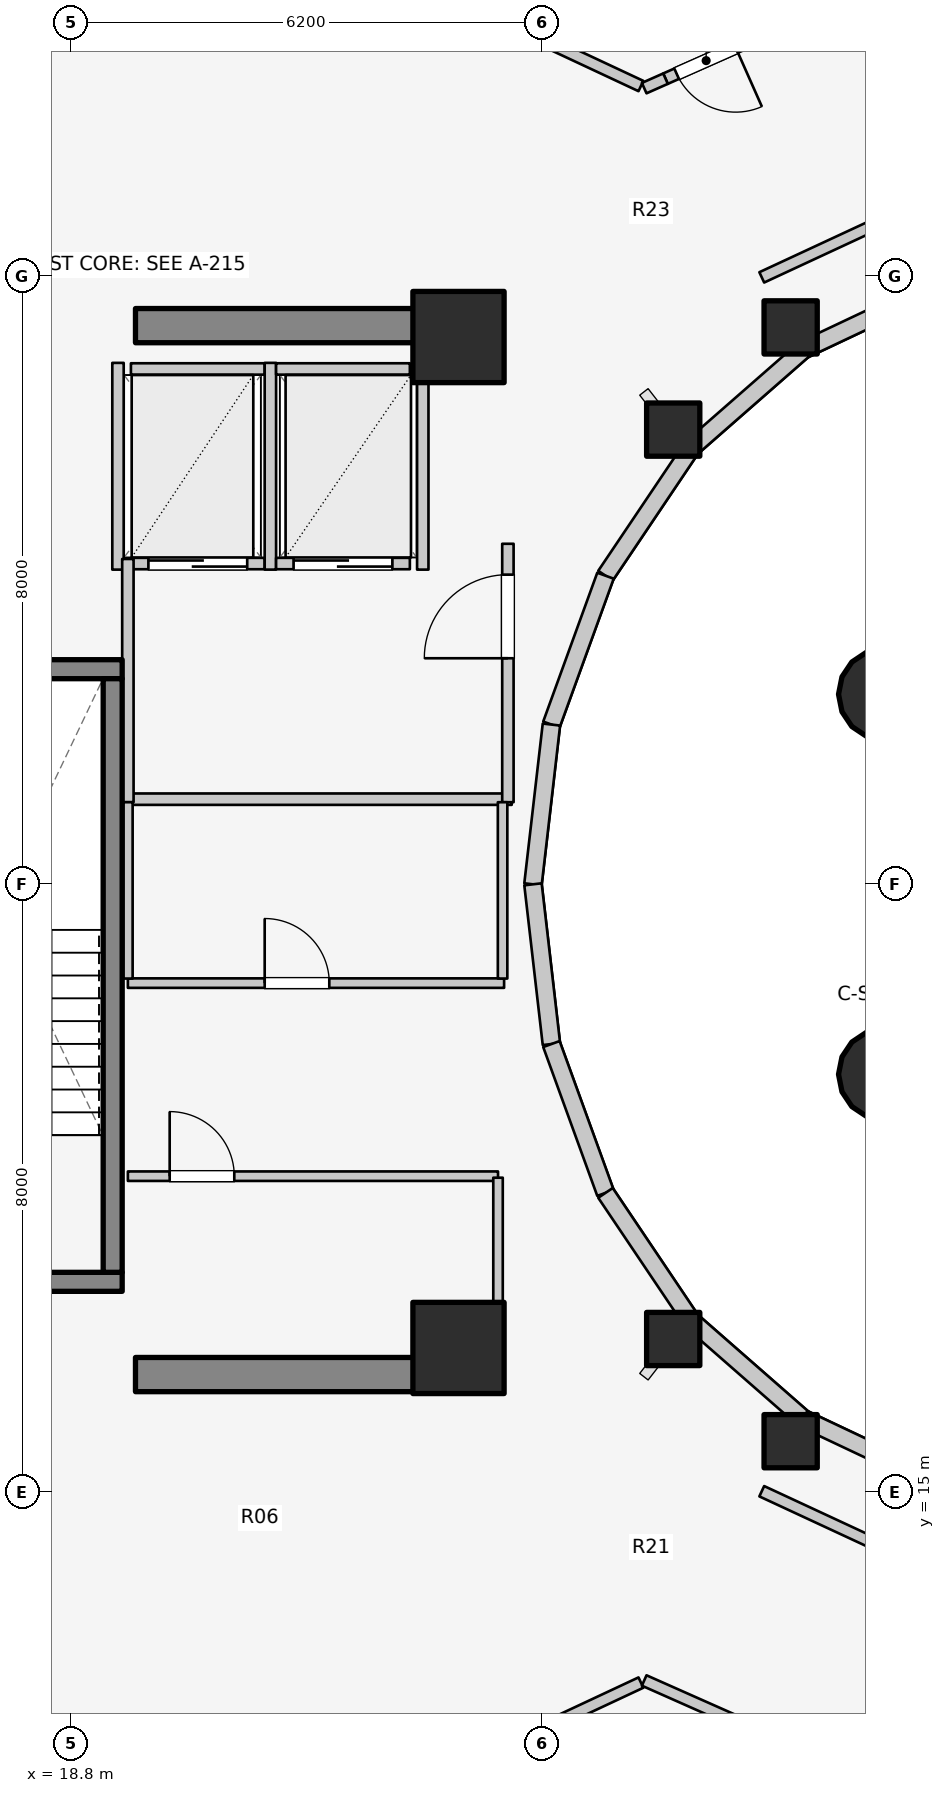
"""IFC4 building model, lengths in metres.
Left out: names, types, materials, properties, quantities, classifications, styles, units other than length and angle.
Written with IfcOpenShell. Run it as: python <this file> out.ifc"""

import sys

from ifc_helpers import new_model, si_unit, direction, frame, frame_2d, origin, origin_2d, place, context, subcontext, project, spatial, rectangle, hollow_circle, extrude, element, fill, save


model = new_model("IFC4")
c1 = context("Model", 3, precision=1e-05, world=origin(), true_north=direction((0.0, 1.0)))
c2 = subcontext(c1, "Body", "Model", "MODEL_VIEW")
j1 = project(units=[si_unit("LENGTHUNIT", "METRE"), si_unit("PLANEANGLEUNIT", "RADIAN")], contexts=[c1])
p1 = place(None, origin())
s1 = spatial("IfcSite", under=j1, at=p1, CompositionType="ELEMENT")
p2 = place(p1, origin())
s2 = spatial("IfcBuilding", under=s1, at=p2, CompositionType="ELEMENT")
p3 = place(p2, frame((0.0, 0.0, 273.2)))
s3 = spatial("IfcBuildingStorey", under=s2, at=p3, CompositionType="ELEMENT", Elevation=273.2)
for number, where, z_axis, x_axis in (
    (1, (19.65, 16.55, 0.0), (0.0, 0.0, 1.0), (1.0, 0.0, 0.0)),
    (2, (19.65, 30.35, 0.0), (0.0, 0.0, 1.0), (1.0, 0.0, 0.0)),
):
    element("IfcWall", number, at=place(p3, frame(where, z_axis=z_axis, x_axis=x_axis)), inside=s3, PredefinedType="SHEAR", context=c2, shape_type="SweptSolid", body=[
        extrude(rectangle(XDim=4.5, YDim=0.45, at=frame_2d((2.25, 0.0))), origin(), (0.0, 0.0, 1.0), 3.2),
    ])
p4 = place(p3, frame((16.105, 17.77, 0.0), z_axis=(0.0, 0.0, 1.0), x_axis=(1.0, 0.0, 0.0)))
e3 = element("IfcWall", 3, at=p4, inside=s3, PredefinedType="SOLIDWALL", context=c2, shape_type="SweptSolid", body=[
    extrude(rectangle(XDim=3.37, YDim=0.25, at=frame_2d((1.685, 0.0))), origin(), (0.0, 0.0, 1.0), 3.2),
])
p5 = place(p4, frame((1.135, 0.0, 0.0)))
e4 = element("IfcOpeningElement", 4, at=p5, cuts=e3, PredefinedType="OPENING", context=c2, shape_type="SweptSolid", body=[
    extrude(rectangle(XDim=1.1, YDim=2.1, at=frame_2d((0.55, 1.05))), frame((0.0, 0.135, 0.0), z_axis=(0.0, -1.0, 0.0), x_axis=(1.0, 0.0, 0.0)), (0.0, 0.0, 1.0), 0.27),
])
p6 = place(p3, frame((16.105, 25.83, 0.0), z_axis=(0.0, 0.0, 1.0), x_axis=(1.0, 0.0, 0.0)))
e5 = element("IfcWall", 5, at=p6, inside=s3, PredefinedType="SOLIDWALL", context=c2, shape_type="SweptSolid", body=[
    extrude(rectangle(XDim=3.37, YDim=0.25, at=frame_2d((1.685, 0.0))), origin(), (0.0, 0.0, 1.0), 3.2),
])
p7 = place(p3, frame((19.35, 17.895, 0.0), z_axis=(0.0, 0.0, 1.0), x_axis=(0.0, 1.0, 0.0)))
e6 = element("IfcWall", 6, at=p7, inside=s3, PredefinedType="SOLIDWALL", context=c2, shape_type="SweptSolid", body=[
    extrude(rectangle(XDim=7.81, YDim=0.25, at=frame_2d((3.905, 0.0))), origin(), (0.0, 0.0, 1.0), 3.2),
])
for number, where, z_axis, x_axis in (
    (7, (23.9, 16.9, 0.0), (0.0, 0.0, 1.0), (1.0, 0.0, 0.0)),
    (8, (23.9, 30.2, 0.0), (0.0, 0.0, 1.0), (1.0, 0.0, 0.0)),
):
    element("IfcColumn", number, at=place(p3, frame(where, z_axis=z_axis, x_axis=x_axis)), inside=s3, PredefinedType="COLUMN", context=c2, shape_type="SweptSolid", body=[
        extrude(rectangle(XDim=1.2, YDim=1.2, at=origin_2d()), origin(), (0.0, 0.0, 1.0), 3.2),
    ])
for number, where, z_axis, x_axis in (
    (9, (28.27, 30.327, 0.0), (0.0, 0.0, 1.0), (1.0, 0.0, 0.0)),
    (10, (26.725, 28.982, 0.0), (0.0, 0.0, 1.0), (1.0, 0.0, 0.0)),
    (11, (26.725, 17.018, 0.0), (0.0, 0.0, 1.0), (1.0, 0.0, 0.0)),
    (12, (28.27, 15.673, 0.0), (0.0, 0.0, 1.0), (1.0, 0.0, 0.0)),
):
    element("IfcColumn", number, at=place(p3, frame(where, z_axis=z_axis, x_axis=x_axis)), inside=s3, PredefinedType="COLUMN", context=c2, shape_type="SweptSolid", body=[
        extrude(rectangle(XDim=0.7, YDim=0.7, at=origin_2d()), origin(), (0.0, 0.0, 1.0), 3.2),
    ])
for number, where, z_axis, x_axis in (
    (13, (29.5, 20.5, 0.0), (0.0, 0.0, 1.0), (1.0, 0.0, 0.0)),
    (14, (29.5, 25.5, 0.0), (0.0, 0.0, 1.0), (1.0, 0.0, 0.0)),
):
    element("IfcColumn", number, at=place(p3, frame(where, z_axis=z_axis, x_axis=x_axis)), inside=s3, PredefinedType="PILASTER", context=c2, shape_type="SweptSolid", body=[
        extrude(hollow_circle(Radius=0.6, WallThickness=0.032, at=origin_2d()), origin(), (0.0, 0.0, 1.0), 3.2),
    ])
p8 = place(p3, frame((30.157, 30.843, 0.0), z_axis=(0.0, 0.0, 1.0), x_axis=(-0.904179699603, -0.427152280606, 0.0)))
e15 = element("IfcWall", 15, at=p8, inside=s3, PredefinedType="STANDARD", context=c2, shape_type="SweptSolid", body=[
    extrude(rectangle(XDim=1.899, YDim=0.23, at=frame_2d((0.95, 0.0))), origin(), (0.0, 0.0, 1.0), 1.32),
])
p9 = place(p3, frame((28.44, 30.032, 0.0), z_axis=(0.0, 0.0, 1.0), x_axis=(-0.752576694707, -0.658504607869, 0.0)))
e16 = element("IfcWall", 16, at=p9, inside=s3, PredefinedType="STANDARD", context=c2, shape_type="SweptSolid", body=[
    extrude(rectangle(XDim=1.959, YDim=0.23, at=frame_2d((0.98, 0.0))), origin(), (0.0, 0.0, 1.0), 1.32),
])
p10 = place(p3, frame((26.965, 28.742, 0.0), z_axis=(0.0, 0.0, 1.0), x_axis=(-0.558197800898, -0.829707909492, 0.0)))
e17 = element("IfcWall", 17, at=p10, inside=s3, PredefinedType="STANDARD", context=c2, shape_type="SweptSolid", body=[
    extrude(rectangle(XDim=2.027, YDim=0.23, at=frame_2d((1.013, 0.0))), origin(), (0.0, 0.0, 1.0), 1.32),
])
p11 = place(p3, frame((25.834, 27.06, 0.0), z_axis=(0.0, 0.0, 1.0), x_axis=(-0.341423187295, -0.93990968033, 0.0)))
e18 = element("IfcWall", 18, at=p11, inside=s3, PredefinedType="STANDARD", context=c2, shape_type="SweptSolid", body=[
    extrude(rectangle(XDim=2.084, YDim=0.23, at=frame_2d((1.042, 0.0))), origin(), (0.0, 0.0, 1.0), 2.9),
])
for number, where, z_axis, x_axis in (
    (19, (25.123, 25.102, 0.0), (0.0, 0.0, 1.0), (-0.115, -0.993, 0.0)),
    (20, (24.88, 23.0, 0.0), (0.0, 0.0, 1.0), (0.115, -0.993, 0.0)),
):
    element("IfcWall", number, at=place(p3, frame(where, z_axis=z_axis, x_axis=x_axis)), inside=s3, PredefinedType="STANDARD", context=c2, shape_type="SweptSolid", body=[
        extrude(rectangle(XDim=2.115, YDim=0.23, at=frame_2d((1.058, 0.0))), origin(), (0.0, 0.0, 1.0), 2.9),
    ])
p12 = place(p3, frame((25.123, 20.898, 0.0), z_axis=(0.0, 0.0, 1.0), x_axis=(0.341423187295, -0.93990968033, 0.0)))
e21 = element("IfcWall", 21, at=p12, inside=s3, PredefinedType="STANDARD", context=c2, shape_type="SweptSolid", body=[
    extrude(rectangle(XDim=2.084, YDim=0.23, at=frame_2d((1.042, 0.0))), origin(), (0.0, 0.0, 1.0), 2.9),
])
p13 = place(p3, frame((25.834, 18.94, 0.0), z_axis=(0.0, 0.0, 1.0), x_axis=(0.558197800898, -0.829707909492, 0.0)))
e22 = element("IfcWall", 22, at=p13, inside=s3, PredefinedType="STANDARD", context=c2, shape_type="SweptSolid", body=[
    extrude(rectangle(XDim=2.027, YDim=0.23, at=frame_2d((1.013, 0.0))), origin(), (0.0, 0.0, 1.0), 1.32),
])
p14 = place(p3, frame((26.965, 17.258, 0.0), z_axis=(0.0, 0.0, 1.0), x_axis=(0.752576694707, -0.658504607869, 0.0)))
e23 = element("IfcWall", 23, at=p14, inside=s3, PredefinedType="STANDARD", context=c2, shape_type="SweptSolid", body=[
    extrude(rectangle(XDim=1.959, YDim=0.23, at=frame_2d((0.98, 0.0))), origin(), (0.0, 0.0, 1.0), 1.32),
])
p15 = place(p3, frame((28.44, 15.968, 0.0), z_axis=(0.0, 0.0, 1.0), x_axis=(0.904179699603, -0.427152280606, 0.0)))
e24 = element("IfcWall", 24, at=p15, inside=s3, PredefinedType="STANDARD", context=c2, shape_type="SweptSolid", body=[
    extrude(rectangle(XDim=1.899, YDim=0.23, at=frame_2d((0.95, 0.0))), origin(), (0.0, 0.0, 1.0), 1.32),
])
p16 = place(p3, frame((19.59, 27.22, 0.0), z_axis=(0.0, 0.0, 1.0), x_axis=(1.0, 0.0, 0.0)))
e25 = element("IfcWall", 25, at=p16, inside=s3, PredefinedType="SOLIDWALL", context=c2, shape_type="SweptSolid", body=[
    extrude(rectangle(XDim=1.76, YDim=0.15, at=frame_2d((0.88, 0.0))), origin(), (0.0, 0.0, 1.0), 2.915),
])
p17 = place(p16, frame((0.23, 0.0, 0.0)))
e26 = element("IfcOpeningElement", 26, at=p17, cuts=e25, PredefinedType="OPENING", context=c2, shape_type="SweptSolid", body=[
    extrude(rectangle(XDim=1.3, YDim=2.1, at=frame_2d((0.65, 1.05))), frame((0.0, 0.085, 0.0), z_axis=(0.0, -1.0, 0.0), x_axis=(1.0, 0.0, 0.0)), (0.0, 0.0, 1.0), 0.17),
])
p18 = place(p3, frame((19.59, 29.78, 0.0), z_axis=(0.0, 0.0, 1.0), x_axis=(1.0, 0.0, 0.0)))
e27 = element("IfcWall", 27, at=p18, inside=s3, PredefinedType="SOLIDWALL", context=c2, shape_type="SweptSolid", body=[
    extrude(rectangle(XDim=1.76, YDim=0.15, at=frame_2d((0.88, 0.0))), origin(), (0.0, 0.0, 1.0), 2.915),
])
for number, where, z_axis, x_axis in (
    (28, (19.42, 27.14, 0.0), (0.0, 0.0, 1.0), (0.0, 1.0, 0.0)),
    (29, (21.425, 27.14, 0.0), (0.0, 0.0, 1.0), (0.0, 1.0, 0.0)),
):
    element("IfcWall", number, at=place(p3, frame(where, z_axis=z_axis, x_axis=x_axis)), inside=s3, PredefinedType="SOLIDWALL", context=c2, shape_type="SweptSolid", body=[
        extrude(rectangle(XDim=2.72, YDim=0.15, at=frame_2d((1.36, 0.0))), origin(), (0.0, 0.0, 1.0), 2.915),
    ])
p19 = place(p3, frame((21.5, 27.22, 0.0), z_axis=(0.0, 0.0, 1.0), x_axis=(1.0, 0.0, 0.0)))
e30 = element("IfcWall", 30, at=p19, inside=s3, PredefinedType="SOLIDWALL", context=c2, shape_type="SweptSolid", body=[
    extrude(rectangle(XDim=1.76, YDim=0.15, at=frame_2d((0.88, 0.0))), origin(), (0.0, 0.0, 1.0), 2.915),
])
p20 = place(p19, frame((0.23, 0.0, 0.0)))
e31 = element("IfcOpeningElement", 31, at=p20, cuts=e30, PredefinedType="OPENING", context=c2, shape_type="SweptSolid", body=[
    extrude(rectangle(XDim=1.3, YDim=2.1, at=frame_2d((0.65, 1.05))), frame((0.0, 0.085, 0.0), z_axis=(0.0, -1.0, 0.0), x_axis=(1.0, 0.0, 0.0)), (0.0, 0.0, 1.0), 0.17),
])
p21 = place(p3, frame((21.5, 29.78, 0.0), z_axis=(0.0, 0.0, 1.0), x_axis=(1.0, 0.0, 0.0)))
e32 = element("IfcWall", 32, at=p21, inside=s3, PredefinedType="SOLIDWALL", context=c2, shape_type="SweptSolid", body=[
    extrude(rectangle(XDim=1.76, YDim=0.15, at=frame_2d((0.88, 0.0))), origin(), (0.0, 0.0, 1.0), 2.915),
])
p22 = place(p3, frame((23.43, 27.14, 0.0), z_axis=(0.0, 0.0, 1.0), x_axis=(0.0, 1.0, 0.0)))
e33 = element("IfcWall", 33, at=p22, inside=s3, PredefinedType="SOLIDWALL", context=c2, shape_type="SweptSolid", body=[
    extrude(rectangle(XDim=2.72, YDim=0.15, at=frame_2d((1.36, 0.0))), origin(), (0.0, 0.0, 1.0), 2.915),
])
p23 = place(p3, frame((19.52, 24.12, 0.0), z_axis=(0.0, 0.0, 1.0), x_axis=(1.0, 0.0, 0.0)))
e34 = element("IfcWall", 34, at=p23, inside=s3, PredefinedType="PARTITIONING", context=c2, shape_type="SweptSolid", body=[
    extrude(rectangle(XDim=5.08, YDim=0.15, at=frame_2d((2.54, 0.0))), origin(), (0.0, 0.0, 1.0), 2.22),
])
p24 = place(p3, frame((19.55, 24.08, 0.0), z_axis=(0.0, 0.0, 1.0), x_axis=(0.0, 1.0, 0.0)))
e35 = element("IfcWall", 35, at=p24, inside=s3, PredefinedType="PARTITIONING", context=c2, shape_type="SweptSolid", body=[
    extrude(rectangle(XDim=3.2, YDim=0.15, at=frame_2d((1.6, 0.0))), origin(), (0.0, 0.0, 1.0), 2.915),
])
p25 = place(p3, frame((24.55, 24.08, 0.0), z_axis=(0.0, 0.0, 1.0), x_axis=(0.0, 1.0, 0.0)))
e36 = element("IfcWall", 36, at=p25, inside=s3, PredefinedType="PARTITIONING", context=c2, shape_type="SweptSolid", body=[
    extrude(rectangle(XDim=3.4, YDim=0.15, at=frame_2d((1.7, 0.0))), origin(), (0.0, 0.0, 1.0), 2.915),
])
p26 = place(p25, frame((1.894, 0.0, 0.0)))
e37 = element("IfcOpeningElement", 37, at=p26, cuts=e36, PredefinedType="OPENING", context=c2, shape_type="SweptSolid", body=[
    extrude(rectangle(XDim=1.1, YDim=2.1, at=frame_2d((0.55, 1.05))), frame((0.0, 0.085, 0.0), z_axis=(0.0, -1.0, 0.0), x_axis=(1.0, 0.0, 0.0)), (0.0, 0.0, 1.0), 0.17),
])
p27 = place(p3, frame((19.55, 19.16, 0.0), z_axis=(0.0, 0.0, 1.0), x_axis=(1.0, 0.0, 0.0)))
e38 = element("IfcWall", 38, at=p27, inside=s3, PredefinedType="PARTITIONING", context=c2, shape_type="SweptSolid", body=[
    extrude(rectangle(XDim=4.87, YDim=0.125, at=frame_2d((2.435, 0.0))), origin(), (0.0, 0.0, 1.0), 2.22),
])
p28 = place(p27, frame((0.55, 0.0, 0.0)))
e39 = element("IfcOpeningElement", 39, at=p28, cuts=e38, PredefinedType="OPENING", context=c2, shape_type="SweptSolid", body=[
    extrude(rectangle(XDim=0.85, YDim=2.05, at=frame_2d((0.425, 1.025))), frame((0.0, 0.073, 0.0), z_axis=(0.0, -1.0, 0.0), x_axis=(1.0, 0.0, 0.0)), (0.0, 0.0, 1.0), 0.145),
])
p29 = place(p3, frame((24.42, 17.1, 0.0), z_axis=(0.0, 0.0, 1.0), x_axis=(0.0, 1.0, 0.0)))
e40 = element("IfcWall", 40, at=p29, inside=s3, PredefinedType="PARTITIONING", context=c2, shape_type="SweptSolid", body=[
    extrude(rectangle(XDim=2.04, YDim=0.125, at=frame_2d((1.02, 0.0))), origin(), (0.0, 0.0, 1.0), 2.491),
])
p30 = place(p3, frame((19.55, 21.7, 0.0), z_axis=(0.0, 0.0, 1.0), x_axis=(1.0, 0.0, 0.0)))
e41 = element("IfcWall", 41, at=p30, inside=s3, PredefinedType="PARTITIONING", context=c2, shape_type="SweptSolid", body=[
    extrude(rectangle(XDim=4.95, YDim=0.125, at=frame_2d((2.475, 0.0))), origin(), (0.0, 0.0, 1.0), 2.22),
])
p31 = place(p30, frame((1.8, 0.0, 0.0)))
e42 = element("IfcOpeningElement", 42, at=p31, cuts=e41, PredefinedType="OPENING", context=c2, shape_type="SweptSolid", body=[
    extrude(rectangle(XDim=0.85, YDim=2.05, at=frame_2d((0.425, 1.025))), frame((0.0, 0.073, 0.0), z_axis=(0.0, -1.0, 0.0), x_axis=(1.0, 0.0, 0.0)), (0.0, 0.0, 1.0), 0.145),
])
for number, where, z_axis, x_axis in (
    (43, (19.55, 21.76, 0.0), (0.0, 0.0, 1.0), (0.0, 1.0, 0.0)),
    (44, (24.48, 21.76, 0.0), (0.0, 0.0, 1.0), (0.0, 1.0, 0.0)),
):
    element("IfcWall", number, at=place(p3, frame(where, z_axis=z_axis, x_axis=x_axis)), inside=s3, PredefinedType="PARTITIONING", context=c2, shape_type="SweptSolid", body=[
        extrude(rectangle(XDim=2.32, YDim=0.125, at=frame_2d((1.16, 0.0))), origin(), (0.0, 0.0, 1.0), 2.915),
    ])
for number, where, z_axis, x_axis in (
    (45, (29.873, 31.906, 0.0), (0.0, 0.0, 1.0), (-0.907, -0.421, 0.0)),
    (46, (27.89, 15.015, 0.0), (0.0, 0.0, 1.0), (0.907, -0.421, 0.0)),
):
    element("IfcWall", number, at=place(p3, frame(where, z_axis=z_axis, x_axis=x_axis)), inside=s3, PredefinedType="PARTITIONING", context=c2, shape_type="SweptSolid", body=[
        extrude(rectangle(XDim=2.186, YDim=0.15, at=frame_2d((1.093, 0.0))), origin(), (0.0, 0.0, 1.0), 1.32),
    ])
for number, where, z_axis, x_axis in (
    (47, (26.3, 33.502, 0.0), (0.0, 0.0, 1.0), (-0.906, 0.424, 0.0)),
    (48, (26.3, 12.498, 0.0), (0.0, 0.0, 1.0), (-0.906, -0.424, 0.0)),
):
    element("IfcWall", number, at=place(p3, frame(where, z_axis=z_axis, x_axis=x_axis)), inside=s3, PredefinedType="PARTITIONING", context=c2, shape_type="SweptSolid", body=[
        extrude(rectangle(XDim=5.419, YDim=0.15, at=frame_2d((2.71, 0.0))), origin(), (0.0, 0.0, 1.0), 1.32),
    ])
p32 = place(p3, frame((27.693, 34.073, 0.0), z_axis=(0.0, 0.0, 1.0), x_axis=(-0.91409532601, -0.40549936494, 0.0)))
e49 = element("IfcWall", 49, at=p32, inside=s3, PredefinedType="PARTITIONING", context=c2, shape_type="SweptSolid", body=[
    extrude(rectangle(XDim=1.17, YDim=0.15, at=frame_2d((0.585, 0.0))), origin(), (0.0, 0.0, 1.0), 2.11),
])
p33 = place(p32, frame((0.16, 0.0, 0.0)))
e50 = element("IfcOpeningElement", 50, at=p33, cuts=e49, PredefinedType="OPENING", context=c2, shape_type="SweptSolid", body=[
    extrude(rectangle(XDim=0.85, YDim=2.05, at=frame_2d((0.425, 1.025))), frame((0.0, 0.085, 0.0), z_axis=(0.0, -1.0, 0.0), x_axis=(1.0, 0.0, 0.0)), (0.0, 0.0, 1.0), 0.17),
])
p34 = place(p3, frame((26.624, 33.599, 0.0), z_axis=(0.0, 0.0, 1.0), x_axis=(-0.914008261485, -0.405695572983, 0.0)))
e51 = element("IfcWall", 51, at=p34, inside=s3, PredefinedType="PARTITIONING", context=c2, shape_type="SweptSolid", body=[
    extrude(rectangle(XDim=0.307, YDim=0.15, at=frame_2d((0.153, 0.0))), origin(), (0.0, 0.0, 1.0), 2.915),
])
p35 = place(p3, frame((26.343, 12.525, 0.0), z_axis=(0.0, 0.0, 1.0), x_axis=(0.913989848226, -0.405737054432, 0.0)))
e52 = element("IfcWall", 52, at=p35, inside=s3, PredefinedType="PARTITIONING", context=c2, shape_type="SweptSolid", body=[
    extrude(rectangle(XDim=2.991, YDim=0.15, at=frame_2d((1.496, 0.0))), origin(), (0.0, 0.0, 1.0), 1.32),
])
p36 = place(p17, origin())
e53 = element("IfcDoor", 53, at=p36, inside=s3, OperationType="DOUBLE_DOOR_SLIDING", PredefinedType="DOOR", context=c2, shape_type="SweptSolid", body=[
    extrude(rectangle(XDim=1.3, YDim=2.1, at=frame_2d((0.65, 1.05))), frame((0.0, 0.025, 0.0), z_axis=(0.0, -1.0, 0.0), x_axis=(1.0, 0.0, 0.0)), (0.0, 0.0, 1.0), 0.05),
])
fill(e26, e53)
p37 = place(p20, origin())
e54 = element("IfcDoor", 54, at=p37, inside=s3, OperationType="DOUBLE_DOOR_SLIDING", PredefinedType="DOOR", context=c2, shape_type="SweptSolid", body=[
    extrude(rectangle(XDim=1.3, YDim=2.1, at=frame_2d((0.65, 1.05))), frame((0.0, 0.025, 0.0), z_axis=(0.0, -1.0, 0.0), x_axis=(1.0, 0.0, 0.0)), (0.0, 0.0, 1.0), 0.05),
])
fill(e31, e54)
p38 = place(p26, origin())
e55 = element("IfcDoor", 55, at=p38, inside=s3, OperationType="SINGLE_SWING_LEFT", PredefinedType="DOOR", context=c2, shape_type="SweptSolid", body=[
    extrude(rectangle(XDim=1.1, YDim=2.1, at=frame_2d((0.55, 1.05))), frame((0.0, 0.025, 0.0), z_axis=(0.0, -1.0, 0.0), x_axis=(1.0, 0.0, 0.0)), (0.0, 0.0, 1.0), 0.05),
])
fill(e37, e55)
p39 = place(p28, origin())
e56 = element("IfcDoor", 56, at=p39, inside=s3, OperationType="SINGLE_SWING_LEFT", PredefinedType="DOOR", context=c2, shape_type="SweptSolid", body=[
    extrude(rectangle(XDim=0.85, YDim=2.05, at=frame_2d((0.425, 1.025))), frame((0.0, 0.025, 0.0), z_axis=(0.0, -1.0, 0.0), x_axis=(1.0, 0.0, 0.0)), (0.0, 0.0, 1.0), 0.05),
])
fill(e39, e56)
p40 = place(p31, origin())
e57 = element("IfcDoor", 57, at=p40, inside=s3, OperationType="SINGLE_SWING_LEFT", PredefinedType="DOOR", context=c2, shape_type="SweptSolid", body=[
    extrude(rectangle(XDim=0.85, YDim=2.05, at=frame_2d((0.425, 1.025))), frame((0.0, 0.025, 0.0), z_axis=(0.0, -1.0, 0.0), x_axis=(1.0, 0.0, 0.0)), (0.0, 0.0, 1.0), 0.05),
])
fill(e42, e57)
p41 = place(p33, origin())
e58 = element("IfcDoor", 58, at=p41, inside=s3, OperationType="SINGLE_SWING_LEFT", PredefinedType="DOOR", context=c2, shape_type="SweptSolid", body=[
    extrude(rectangle(XDim=0.85, YDim=2.05, at=frame_2d((0.425, 1.025))), frame((0.0, 0.025, 0.0), z_axis=(0.0, -1.0, 0.0), x_axis=(1.0, 0.0, 0.0)), (0.0, 0.0, 1.0), 0.05),
])
fill(e50, e58)
save(model, sys.argv[1])
